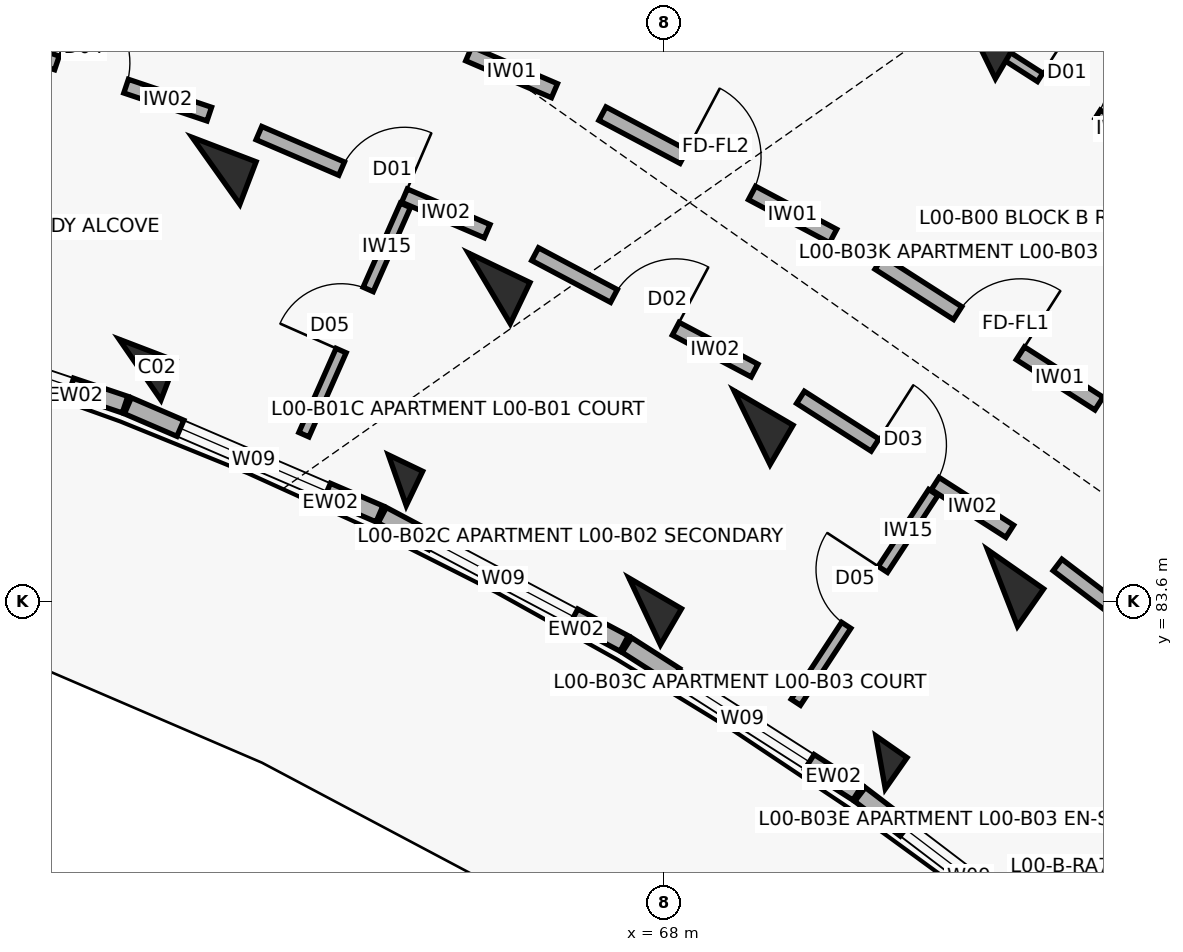
"""IFC4 building model, lengths in metres.
Left out: names, types, materials, properties, quantities, classifications, styles, units other than length and angle.
Written with IfcOpenShell. Run it as: python <this file> out.ifc"""

import sys

from ifc_helpers import new_model, si_unit, direction, frame, frame_2d, origin, origin_2d, place, context, subcontext, project, spatial, rectangle, extrude, element, fill, save


model = new_model("IFC4")
c1 = context("Model", 3, precision=1e-05, world=origin(), true_north=direction((0.0, 1.0)))
c2 = subcontext(c1, "Body", "Model", "MODEL_VIEW")
j1 = project(units=[si_unit("LENGTHUNIT", "METRE"), si_unit("PLANEANGLEUNIT", "RADIAN")], contexts=[c1])
p1 = place(None, origin())
s1 = spatial("IfcSite", under=j1, at=p1, CompositionType="ELEMENT")
p2 = place(p1, origin())
s2 = spatial("IfcBuilding", under=s1, at=p2, CompositionType="ELEMENT")
p3 = place(p2, origin())
s3 = spatial("IfcBuildingStorey", under=s2, at=p3, CompositionType="ELEMENT", Elevation=0.0)
p4 = place(p3, frame((61.111, 86.646, 0.0), z_axis=(0.0, 0.0, 1.0), x_axis=(0.357064076459, 0.934079892355, 0.0)))
e1 = element("IfcColumn", 1, at=p4, inside=s3, PredefinedType="COLUMN", context=c2, shape_type="SweptSolid", body=[
    extrude(rectangle(XDim=0.55, YDim=0.8, at=origin_2d()), origin(), (0.0, 0.0, 1.0), 4.5),
])
p5 = place(p3, frame((62.111, 89.261, 0.0), z_axis=(0.0, 0.0, 1.0), x_axis=(0.357064076459, 0.934079892355, 0.0)))
e2 = element("IfcColumn", 2, at=p5, inside=s3, PredefinedType="COLUMN", context=c2, shape_type="SweptSolid", body=[
    extrude(rectangle(XDim=0.6, YDim=0.9, at=origin_2d()), origin(), (0.0, 0.0, 1.0), 4.5),
])
p6 = place(p3, frame((64.496, 85.191, 0.0), z_axis=(0.0, 0.0, 1.0), x_axis=(0.432085748802, 0.901832526405, 0.0)))
e3 = element("IfcColumn", 3, at=p6, inside=s3, PredefinedType="COLUMN", context=c2, shape_type="SweptSolid", body=[
    extrude(rectangle(XDim=0.5, YDim=0.5, at=origin_2d()), origin(), (0.0, 0.0, 1.0), 4.5),
])
p7 = place(p3, frame((65.706, 87.716, 0.0), z_axis=(0.0, 0.0, 1.0), x_axis=(0.432085748802, 0.901832526405, 0.0)))
e4 = element("IfcColumn", 4, at=p7, inside=s3, PredefinedType="COLUMN", context=c2, shape_type="SweptSolid", body=[
    extrude(rectangle(XDim=0.6, YDim=0.9, at=origin_2d()), origin(), (0.0, 0.0, 1.0), 4.5),
])
p8 = place(p3, frame((67.751, 83.464, 0.0), z_axis=(0.0, 0.0, 1.0), x_axis=(0.504226211181, 0.863571611366, 0.0)))
e5 = element("IfcColumn", 5, at=p8, inside=s3, PredefinedType="COLUMN", context=c2, shape_type="SweptSolid", body=[
    extrude(rectangle(XDim=0.55, YDim=0.8, at=origin_2d()), origin(), (0.0, 0.0, 1.0), 4.5),
])
for number, where, z_axis, x_axis in (
    (6, (69.163, 85.882, 0.0), (0.0, 0.0, 1.0), (0.504, 0.864, 0.0)),
    (7, (72.127, 90.96, 0.0), (0.0, 0.0, 1.0), (0.504, 0.864, 0.0)),
):
    element("IfcColumn", number, at=place(p3, frame(where, z_axis=z_axis, x_axis=x_axis)), inside=s3, PredefinedType="COLUMN", context=c2, shape_type="SweptSolid", body=[
        extrude(rectangle(XDim=0.6, YDim=0.9, at=origin_2d()), origin(), (0.0, 0.0, 1.0), 4.5),
    ])
p9 = place(p3, frame((70.854, 81.478, 0.0), z_axis=(0.0, 0.0, 1.0), x_axis=(0.573004420611, 0.819552276527, 0.0)))
e8 = element("IfcColumn", 8, at=p9, inside=s3, PredefinedType="COLUMN", context=c2, shape_type="SweptSolid", body=[
    extrude(rectangle(XDim=0.5, YDim=0.5, at=origin_2d()), origin(), (0.0, 0.0, 1.0), 4.5),
])
p10 = place(p3, frame((72.458, 83.773, 0.0), z_axis=(0.0, 0.0, 1.0), x_axis=(0.573004420611, 0.819552276527, 0.0)))
e9 = element("IfcColumn", 9, at=p10, inside=s3, PredefinedType="COLUMN", context=c2, shape_type="SweptSolid", body=[
    extrude(rectangle(XDim=0.6, YDim=0.9, at=origin_2d()), origin(), (0.0, 0.0, 1.0), 4.5),
])
p11 = place(p3, frame((57.498, 87.333, 0.0), z_axis=(0.0, 0.0, 1.0), x_axis=(0.947880824442, -0.318625081649, 0.0)))
e10 = element("IfcWall", 10, at=p11, inside=s3, PredefinedType="SOLIDWALL", context=c2, shape_type="SweptSolid", body=[
    extrude(rectangle(XDim=3.604, YDim=0.23, at=frame_2d((1.802, 0.0))), origin(), (0.0, 0.0, 1.0), 3.45),
])
p12 = place(p11, frame((0.752, 0.0, 0.32)))
e11 = element("IfcOpeningElement", 11, at=p12, cuts=e10, PredefinedType="OPENING", context=c2, shape_type="SweptSolid", body=[
    extrude(rectangle(XDim=2.1, YDim=1.65, at=frame_2d((1.05, 0.825))), frame((0.0, 0.125, 0.0), z_axis=(0.0, -1.0, 0.0), x_axis=(1.0, 0.0, 0.0)), (0.0, 0.0, 1.0), 0.25),
])
p13 = place(p3, frame((60.951, 86.171, 0.0), z_axis=(0.0, 0.0, 1.0), x_axis=(0.918713438577, -0.394924825477, 0.0)))
e12 = element("IfcWall", 12, at=p13, inside=s3, PredefinedType="SOLIDWALL", context=c2, shape_type="SweptSolid", body=[
    extrude(rectangle(XDim=3.604, YDim=0.23, at=frame_2d((1.802, 0.0))), origin(), (0.0, 0.0, 1.0), 3.45),
])
p14 = place(p13, frame((0.752, 0.0, 0.32)))
e13 = element("IfcOpeningElement", 13, at=p14, cuts=e12, PredefinedType="OPENING", context=c2, shape_type="SweptSolid", body=[
    extrude(rectangle(XDim=2.1, YDim=1.65, at=frame_2d((1.05, 0.825))), frame((0.0, 0.125, 0.0), z_axis=(0.0, -1.0, 0.0), x_axis=(1.0, 0.0, 0.0)), (0.0, 0.0, 1.0), 0.25),
])
p15 = place(p3, frame((64.297, 84.73, 0.0), z_axis=(0.0, 0.0, 1.0), x_axis=(0.883438308286, -0.468547495407, 0.0)))
e14 = element("IfcWall", 14, at=p15, inside=s3, PredefinedType="SOLIDWALL", context=c2, shape_type="SweptSolid", body=[
    extrude(rectangle(XDim=3.604, YDim=0.23, at=frame_2d((1.802, 0.0))), origin(), (0.0, 0.0, 1.0), 3.45),
])
p16 = place(p15, frame((0.752, 0.0, 0.32)))
e15 = element("IfcOpeningElement", 15, at=p16, cuts=e14, PredefinedType="OPENING", context=c2, shape_type="SweptSolid", body=[
    extrude(rectangle(XDim=2.1, YDim=1.65, at=frame_2d((1.05, 0.825))), frame((0.0, 0.125, 0.0), z_axis=(0.0, -1.0, 0.0), x_axis=(1.0, 0.0, 0.0)), (0.0, 0.0, 1.0), 0.25),
])
p17 = place(p3, frame((67.515, 83.022, 0.0), z_axis=(0.0, 0.0, 1.0), x_axis=(0.84225540507, -0.539078688718, 0.0)))
e16 = element("IfcWall", 16, at=p17, inside=s3, PredefinedType="SOLIDWALL", context=c2, shape_type="SweptSolid", body=[
    extrude(rectangle(XDim=3.604, YDim=0.23, at=frame_2d((1.802, 0.0))), origin(), (0.0, 0.0, 1.0), 3.45),
])
p18 = place(p17, frame((0.752, 0.0, 0.32)))
e17 = element("IfcOpeningElement", 17, at=p18, cuts=e16, PredefinedType="OPENING", context=c2, shape_type="SweptSolid", body=[
    extrude(rectangle(XDim=2.1, YDim=1.65, at=frame_2d((1.05, 0.825))), frame((0.0, 0.125, 0.0), z_axis=(0.0, -1.0, 0.0), x_axis=(1.0, 0.0, 0.0)), (0.0, 0.0, 1.0), 0.25),
])
p19 = place(p3, frame((70.583, 81.056, 0.0), z_axis=(0.0, 0.0, 1.0), x_axis=(0.795473707045, -0.605988103349, 0.0)))
e18 = element("IfcWall", 18, at=p19, inside=s3, PredefinedType="SOLIDWALL", context=c2, shape_type="SweptSolid", body=[
    extrude(rectangle(XDim=3.604, YDim=0.23, at=frame_2d((1.802, 0.0))), origin(), (0.0, 0.0, 1.0), 3.45),
])
p20 = place(p19, frame((0.752, 0.0, 0.32)))
e19 = element("IfcOpeningElement", 19, at=p20, cuts=e18, PredefinedType="OPENING", context=c2, shape_type="SweptSolid", body=[
    extrude(rectangle(XDim=2.1, YDim=1.65, at=frame_2d((1.05, 0.825))), frame((0.0, 0.125, 0.0), z_axis=(0.0, -1.0, 0.0), x_axis=(1.0, 0.0, 0.0)), (0.0, 0.0, 1.0), 0.25),
])
p21 = place(p3, frame((58.923, 91.049, 0.0), z_axis=(0.0, 0.0, 1.0), x_axis=(0.94787351033, -0.318646839643, 0.0)))
e20 = element("IfcWall", 20, at=p21, inside=s3, PredefinedType="SOLIDWALL", context=c2, shape_type="SweptSolid", body=[
    extrude(rectangle(XDim=3.269, YDim=0.19, at=frame_2d((1.634, 0.0))), origin(), (0.0, 0.0, 1.0), 3.34),
])
p22 = place(p21, frame((1.154, 0.0, 0.0)))
e21 = element("IfcOpeningElement", 21, at=p22, cuts=e20, PredefinedType="OPENING", context=c2, shape_type="SweptSolid", body=[
    extrude(rectangle(XDim=0.96, YDim=2.1, at=frame_2d((0.48, 1.05))), frame((0.0, 0.105, 0.0), z_axis=(0.0, -1.0, 0.0), x_axis=(1.0, 0.0, 0.0)), (0.0, 0.0, 1.0), 0.21),
])
p23 = place(p3, frame((63.407, 91.673, 0.0), z_axis=(0.0, 0.0, 1.0), x_axis=(0.918718172399, -0.394913813008, 0.0)))
e22 = element("IfcWall", 22, at=p23, inside=s3, PredefinedType="SOLIDWALL", context=c2, shape_type="SweptSolid", body=[
    extrude(rectangle(XDim=3.436, YDim=0.2, at=frame_2d((1.718, 0.0))), origin(), (0.0, 0.0, 1.0), 3.34),
])
p24 = place(p23, frame((1.228, 0.0, 0.0)))
e23 = element("IfcOpeningElement", 23, at=p24, cuts=e22, PredefinedType="OPENING", context=c2, shape_type="SweptSolid", body=[
    extrude(rectangle(XDim=0.98, YDim=2.15, at=frame_2d((0.49, 1.075))), frame((0.0, 0.11, 0.0), z_axis=(0.0, -1.0, 0.0), x_axis=(1.0, 0.0, 0.0)), (0.0, 0.0, 1.0), 0.22),
])
p25 = place(p3, frame((62.675, 89.758, 0.0), z_axis=(0.0, 0.0, 1.0), x_axis=(0.918723391052, -0.394901672235, 0.0)))
e24 = element("IfcWall", 24, at=p25, inside=s3, PredefinedType="SOLIDWALL", context=c2, shape_type="SweptSolid", body=[
    extrude(rectangle(XDim=3.269, YDim=0.19, at=frame_2d((1.634, 0.0))), origin(), (0.0, 0.0, 1.0), 3.34),
])
p26 = place(p25, frame((1.184, 0.0, 0.0)))
e25 = element("IfcOpeningElement", 25, at=p26, cuts=e24, PredefinedType="OPENING", context=c2, shape_type="SweptSolid", body=[
    extrude(rectangle(XDim=0.9, YDim=2.1, at=frame_2d((0.45, 1.05))), frame((0.0, 0.105, 0.0), z_axis=(0.0, -1.0, 0.0), x_axis=(1.0, 0.0, 0.0)), (0.0, 0.0, 1.0), 0.21),
])
p27 = place(p3, frame((63.267, 85.79, 0.0), z_axis=(0.0, 0.0, 1.0), x_axis=(0.404545283439, 0.91451796792, 0.0)))
e26 = element("IfcWall", 26, at=p27, inside=s3, PredefinedType="PARTITIONING", context=c2, shape_type="SweptSolid", body=[
    extrude(rectangle(XDim=3.3, YDim=0.145, at=frame_2d((1.65, 0.0))), origin(), (0.0, 0.0, 1.0), 3.34),
])
p28 = place(p27, frame((1.21, 0.0, 0.0)))
e27 = element("IfcOpeningElement", 27, at=p28, cuts=e26, PredefinedType="OPENING", context=c2, shape_type="SweptSolid", body=[
    extrude(rectangle(XDim=0.88, YDim=2.1, at=frame_2d((0.44, 1.05))), frame((0.0, 0.083, 0.0), z_axis=(0.0, -1.0, 0.0), x_axis=(1.0, 0.0, 0.0)), (0.0, 0.0, 1.0), 0.165),
])
p29 = place(p3, frame((67.194, 90.014, 0.0), z_axis=(0.0, 0.0, 1.0), x_axis=(0.883410853063, -0.468599258099, 0.0)))
e28 = element("IfcWall", 28, at=p29, inside=s3, PredefinedType="SOLIDWALL", context=c2, shape_type="SweptSolid", body=[
    extrude(rectangle(XDim=3.436, YDim=0.2, at=frame_2d((1.718, 0.0))), origin(), (0.0, 0.0, 1.0), 3.34),
])
p30 = place(p29, frame((1.208, 0.0, 0.0)))
e29 = element("IfcOpeningElement", 29, at=p30, cuts=e28, PredefinedType="OPENING", context=c2, shape_type="SweptSolid", body=[
    extrude(rectangle(XDim=1.02, YDim=2.15, at=frame_2d((0.51, 1.075))), frame((0.0, 0.11, 0.0), z_axis=(0.0, -1.0, 0.0), x_axis=(1.0, 0.0, 0.0)), (0.0, 0.0, 1.0), 0.22),
])
p31 = place(p3, frame((66.309, 88.165, 0.0), z_axis=(0.0, 0.0, 1.0), x_axis=(0.883444301944, -0.468536194293, 0.0)))
e30 = element("IfcWall", 30, at=p31, inside=s3, PredefinedType="SOLIDWALL", context=c2, shape_type="SweptSolid", body=[
    extrude(rectangle(XDim=3.269, YDim=0.19, at=frame_2d((1.634, 0.0))), origin(), (0.0, 0.0, 1.0), 3.34),
])
p32 = place(p31, frame((1.174, 0.0, 0.0)))
e31 = element("IfcOpeningElement", 31, at=p32, cuts=e30, PredefinedType="OPENING", context=c2, shape_type="SweptSolid", body=[
    extrude(rectangle(XDim=0.92, YDim=2.1, at=frame_2d((0.46, 1.05))), frame((0.0, 0.105, 0.0), z_axis=(0.0, -1.0, 0.0), x_axis=(1.0, 0.0, 0.0)), (0.0, 0.0, 1.0), 0.21),
])
p33 = place(p3, frame((70.834, 88.051, 0.0), z_axis=(0.0, 0.0, 1.0), x_axis=(0.842257205985, -0.539075874963, 0.0)))
e32 = element("IfcWall", 32, at=p33, inside=s3, PredefinedType="SOLIDWALL", context=c2, shape_type="SweptSolid", body=[
    extrude(rectangle(XDim=3.436, YDim=0.2, at=frame_2d((1.718, 0.0))), origin(), (0.0, 0.0, 1.0), 3.34),
])
p34 = place(p33, frame((1.228, 0.0, 0.0)))
e33 = element("IfcOpeningElement", 33, at=p34, cuts=e32, PredefinedType="OPENING", context=c2, shape_type="SweptSolid", body=[
    extrude(rectangle(XDim=0.98, YDim=2.15, at=frame_2d((0.49, 1.075))), frame((0.0, 0.11, 0.0), z_axis=(0.0, -1.0, 0.0), x_axis=(1.0, 0.0, 0.0)), (0.0, 0.0, 1.0), 0.22),
])
p35 = place(p3, frame((69.8, 86.281, 0.0), z_axis=(0.0, 0.0, 1.0), x_axis=(0.842225276846, -0.539125758095, 0.0)))
e34 = element("IfcWall", 34, at=p35, inside=s3, PredefinedType="SOLIDWALL", context=c2, shape_type="SweptSolid", body=[
    extrude(rectangle(XDim=3.269, YDim=0.19, at=frame_2d((1.634, 0.0))), origin(), (0.0, 0.0, 1.0), 3.34),
])
p36 = place(p35, frame((1.164, 0.0, 0.0)))
e35 = element("IfcOpeningElement", 35, at=p36, cuts=e34, PredefinedType="OPENING", context=c2, shape_type="SweptSolid", body=[
    extrude(rectangle(XDim=0.94, YDim=2.1, at=frame_2d((0.47, 1.05))), frame((0.0, 0.105, 0.0), z_axis=(0.0, -1.0, 0.0), x_axis=(1.0, 0.0, 0.0)), (0.0, 0.0, 1.0), 0.21),
])
p37 = place(p3, frame((69.739, 82.269, 0.0), z_axis=(0.0, 0.0, 1.0), x_axis=(0.547920940513, 0.836530120765, 0.0)))
e36 = element("IfcWall", 36, at=p37, inside=s3, PredefinedType="PARTITIONING", context=c2, shape_type="SweptSolid", body=[
    extrude(rectangle(XDim=3.3, YDim=0.145, at=frame_2d((1.65, 0.0))), origin(), (0.0, 0.0, 1.0), 3.34),
])
p38 = place(p37, frame((1.21, 0.0, 0.0)))
e37 = element("IfcOpeningElement", 37, at=p38, cuts=e36, PredefinedType="OPENING", context=c2, shape_type="SweptSolid", body=[
    extrude(rectangle(XDim=0.88, YDim=2.1, at=frame_2d((0.44, 1.05))), frame((0.0, 0.083, 0.0), z_axis=(0.0, -1.0, 0.0), x_axis=(1.0, 0.0, 0.0)), (0.0, 0.0, 1.0), 0.165),
])
p39 = place(p3, frame((72.405, 90.842, 0.0), z_axis=(0.0, 0.0, 1.0), x_axis=(0.842271400662, -0.539053696423, 0.0)))
e38 = element("IfcWall", 38, at=p39, inside=s3, PredefinedType="PARTITIONING", context=c2, shape_type="SweptSolid", body=[
    extrude(rectangle(XDim=3.797, YDim=0.13, at=frame_2d((1.898, 0.0))), origin(), (0.0, 0.0, 1.0), 3.34),
])
p40 = place(p39, frame((0.65, 0.0, 0.0)))
e39 = element("IfcOpeningElement", 39, at=p40, cuts=e38, PredefinedType="OPENING", context=c2, shape_type="SweptSolid", body=[
    extrude(rectangle(XDim=0.9, YDim=2.1, at=frame_2d((0.45, 1.05))), frame((0.0, 0.075, 0.0), z_axis=(0.0, -1.0, 0.0), x_axis=(1.0, 0.0, 0.0)), (0.0, 0.0, 1.0), 0.15),
])
p41 = place(p39, frame((2.267, 0.0, 0.0)))
e40 = element("IfcOpeningElement", 40, at=p41, cuts=e38, PredefinedType="OPENING", context=c2, shape_type="SweptSolid", body=[
    extrude(rectangle(XDim=0.88, YDim=2.1, at=frame_2d((0.44, 1.05))), frame((0.0, 0.075, 0.0), z_axis=(0.0, -1.0, 0.0), x_axis=(1.0, 0.0, 0.0)), (0.0, 0.0, 1.0), 0.15),
])
p42 = place(p3, frame((73.182, 84.076, 0.0), z_axis=(0.0, 0.0, 1.0), x_axis=(0.795501577908, -0.605951515838, 0.0)))
e41 = element("IfcWall", 41, at=p42, inside=s3, PredefinedType="SOLIDWALL", context=c2, shape_type="SweptSolid", body=[
    extrude(rectangle(XDim=3.129, YDim=0.19, at=frame_2d((1.564, 0.0))), origin(), (0.0, 0.0, 1.0), 3.34),
])
p43 = place(p42, frame((1.004, 0.0, 0.0)))
e42 = element("IfcOpeningElement", 42, at=p43, cuts=e41, PredefinedType="OPENING", context=c2, shape_type="SweptSolid", body=[
    extrude(rectangle(XDim=1.12, YDim=2.15, at=frame_2d((0.56, 1.075))), frame((0.0, 0.105, 0.0), z_axis=(0.0, -1.0, 0.0), x_axis=(1.0, 0.0, 0.0)), (0.0, 0.0, 1.0), 0.21),
])
p44 = place(p12, origin())
e43 = element("IfcWindow", 43, at=p44, inside=s3, PartitioningType="TRIPLE_PANEL_VERTICAL", PredefinedType="WINDOW", context=c2, shape_type="SweptSolid", body=[
    extrude(rectangle(XDim=2.1, YDim=1.65, at=frame_2d((1.05, 0.825))), frame((0.0, 0.03, 0.0), z_axis=(0.0, -1.0, 0.0), x_axis=(1.0, 0.0, 0.0)), (0.0, 0.0, 1.0), 0.06),
])
fill(e11, e43)
p45 = place(p14, origin())
e44 = element("IfcWindow", 44, at=p45, inside=s3, PartitioningType="TRIPLE_PANEL_VERTICAL", PredefinedType="WINDOW", context=c2, shape_type="SweptSolid", body=[
    extrude(rectangle(XDim=2.1, YDim=1.65, at=frame_2d((1.05, 0.825))), frame((0.0, 0.03, 0.0), z_axis=(0.0, -1.0, 0.0), x_axis=(1.0, 0.0, 0.0)), (0.0, 0.0, 1.0), 0.06),
])
fill(e13, e44)
p46 = place(p16, origin())
e45 = element("IfcWindow", 45, at=p46, inside=s3, PartitioningType="TRIPLE_PANEL_VERTICAL", PredefinedType="WINDOW", context=c2, shape_type="SweptSolid", body=[
    extrude(rectangle(XDim=2.1, YDim=1.65, at=frame_2d((1.05, 0.825))), frame((0.0, 0.03, 0.0), z_axis=(0.0, -1.0, 0.0), x_axis=(1.0, 0.0, 0.0)), (0.0, 0.0, 1.0), 0.06),
])
fill(e15, e45)
p47 = place(p18, origin())
e46 = element("IfcWindow", 46, at=p47, inside=s3, PartitioningType="TRIPLE_PANEL_VERTICAL", PredefinedType="WINDOW", context=c2, shape_type="SweptSolid", body=[
    extrude(rectangle(XDim=2.1, YDim=1.65, at=frame_2d((1.05, 0.825))), frame((0.0, 0.03, 0.0), z_axis=(0.0, -1.0, 0.0), x_axis=(1.0, 0.0, 0.0)), (0.0, 0.0, 1.0), 0.06),
])
fill(e17, e46)
p48 = place(p20, origin())
e47 = element("IfcWindow", 47, at=p48, inside=s3, PartitioningType="TRIPLE_PANEL_VERTICAL", PredefinedType="WINDOW", context=c2, shape_type="SweptSolid", body=[
    extrude(rectangle(XDim=2.1, YDim=1.65, at=frame_2d((1.05, 0.825))), frame((0.0, 0.03, 0.0), z_axis=(0.0, -1.0, 0.0), x_axis=(1.0, 0.0, 0.0)), (0.0, 0.0, 1.0), 0.06),
])
fill(e19, e47)
p49 = place(p22, origin())
e48 = element("IfcDoor", 48, at=p49, inside=s3, OperationType="SINGLE_SWING_LEFT", PredefinedType="DOOR", context=c2, shape_type="SweptSolid", body=[
    extrude(rectangle(XDim=0.96, YDim=2.1, at=frame_2d((0.48, 1.05))), frame((0.0, 0.025, 0.0), z_axis=(0.0, -1.0, 0.0), x_axis=(1.0, 0.0, 0.0)), (0.0, 0.0, 1.0), 0.05),
])
fill(e21, e48)
p50 = place(p24, origin())
e49 = element("IfcDoor", 49, at=p50, inside=s3, OperationType="SINGLE_SWING_LEFT", PredefinedType="DOOR", context=c2, shape_type="SweptSolid", body=[
    extrude(rectangle(XDim=0.98, YDim=2.15, at=frame_2d((0.49, 1.075))), frame((0.0, 0.025, 0.0), z_axis=(0.0, -1.0, 0.0), x_axis=(1.0, 0.0, 0.0)), (0.0, 0.0, 1.0), 0.05),
])
fill(e23, e49)
p51 = place(p26, origin())
e50 = element("IfcDoor", 50, at=p51, inside=s3, OperationType="SINGLE_SWING_RIGHT", PredefinedType="DOOR", context=c2, shape_type="SweptSolid", body=[
    extrude(rectangle(XDim=0.9, YDim=2.1, at=frame_2d((0.45, 1.05))), frame((0.0, 0.025, 0.0), z_axis=(0.0, -1.0, 0.0), x_axis=(1.0, 0.0, 0.0)), (0.0, 0.0, 1.0), 0.05),
])
fill(e25, e50)
p52 = place(p28, origin())
e51 = element("IfcDoor", 51, at=p52, inside=s3, OperationType="SINGLE_SWING_LEFT", PredefinedType="DOOR", context=c2, shape_type="SweptSolid", body=[
    extrude(rectangle(XDim=0.88, YDim=2.1, at=frame_2d((0.44, 1.05))), frame((0.0, 0.025, 0.0), z_axis=(0.0, -1.0, 0.0), x_axis=(1.0, 0.0, 0.0)), (0.0, 0.0, 1.0), 0.05),
])
fill(e27, e51)
p53 = place(p30, origin())
e52 = element("IfcDoor", 52, at=p53, inside=s3, OperationType="SINGLE_SWING_LEFT", PredefinedType="DOOR", context=c2, shape_type="SweptSolid", body=[
    extrude(rectangle(XDim=1.02, YDim=2.15, at=frame_2d((0.51, 1.075))), frame((0.0, 0.025, 0.0), z_axis=(0.0, -1.0, 0.0), x_axis=(1.0, 0.0, 0.0)), (0.0, 0.0, 1.0), 0.05),
])
fill(e29, e52)
p54 = place(p32, origin())
e53 = element("IfcDoor", 53, at=p54, inside=s3, OperationType="SINGLE_SWING_RIGHT", PredefinedType="DOOR", context=c2, shape_type="SweptSolid", body=[
    extrude(rectangle(XDim=0.92, YDim=2.1, at=frame_2d((0.46, 1.05))), frame((0.0, 0.025, 0.0), z_axis=(0.0, -1.0, 0.0), x_axis=(1.0, 0.0, 0.0)), (0.0, 0.0, 1.0), 0.05),
])
fill(e31, e53)
p55 = place(p34, origin())
e54 = element("IfcDoor", 54, at=p55, inside=s3, OperationType="SINGLE_SWING_RIGHT", PredefinedType="DOOR", context=c2, shape_type="SweptSolid", body=[
    extrude(rectangle(XDim=0.98, YDim=2.15, at=frame_2d((0.49, 1.075))), frame((0.0, 0.025, 0.0), z_axis=(0.0, -1.0, 0.0), x_axis=(1.0, 0.0, 0.0)), (0.0, 0.0, 1.0), 0.05),
])
fill(e33, e54)
p56 = place(p36, origin())
e55 = element("IfcDoor", 55, at=p56, inside=s3, OperationType="SINGLE_SWING_LEFT", PredefinedType="DOOR", context=c2, shape_type="SweptSolid", body=[
    extrude(rectangle(XDim=0.94, YDim=2.1, at=frame_2d((0.47, 1.05))), frame((0.0, 0.025, 0.0), z_axis=(0.0, -1.0, 0.0), x_axis=(1.0, 0.0, 0.0)), (0.0, 0.0, 1.0), 0.05),
])
fill(e35, e55)
p57 = place(p38, origin())
e56 = element("IfcDoor", 56, at=p57, inside=s3, OperationType="SINGLE_SWING_RIGHT", PredefinedType="DOOR", context=c2, shape_type="SweptSolid", body=[
    extrude(rectangle(XDim=0.88, YDim=2.1, at=frame_2d((0.44, 1.05))), frame((0.0, 0.025, 0.0), z_axis=(0.0, -1.0, 0.0), x_axis=(1.0, 0.0, 0.0)), (0.0, 0.0, 1.0), 0.05),
])
fill(e37, e56)
p58 = place(p40, origin())
e57 = element("IfcDoor", 57, at=p58, inside=s3, OperationType="SINGLE_SWING_LEFT", PredefinedType="DOOR", context=c2, shape_type="SweptSolid", body=[
    extrude(rectangle(XDim=0.9, YDim=2.1, at=frame_2d((0.45, 1.05))), frame((0.0, 0.025, 0.0), z_axis=(0.0, -1.0, 0.0), x_axis=(1.0, 0.0, 0.0)), (0.0, 0.0, 1.0), 0.05),
])
fill(e39, e57)
save(model, sys.argv[1])
